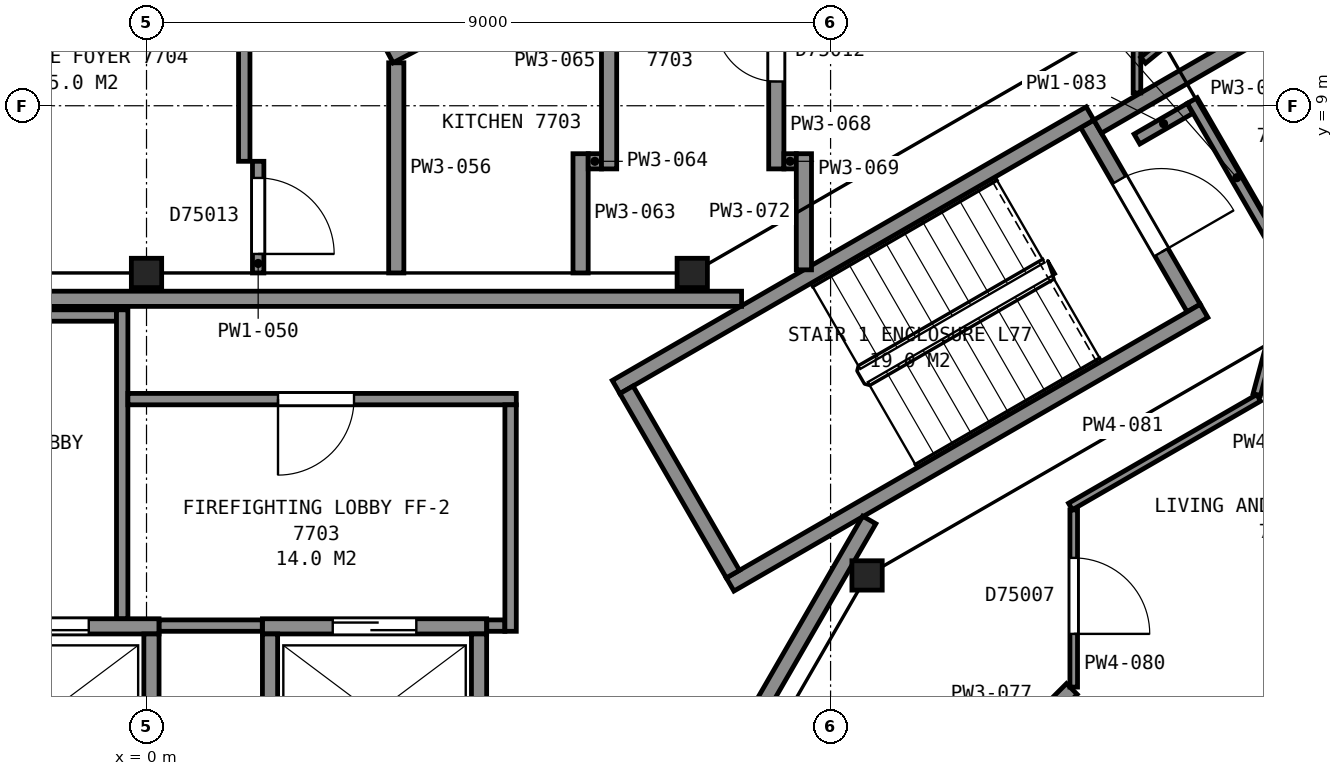
"""IFC4 building model, lengths in metres.
Left out: names, types, materials, properties, quantities, classifications, styles, units other than length and angle.
Written with IfcOpenShell. Run it as: python <this file> out.ifc"""

import sys

from ifc_helpers import new_model, si_unit, direction, frame, frame_2d, origin, origin_2d, place, context, subcontext, project, spatial, rectangle, i_section, extrude, element, fill, save


model = new_model("IFC4")
c1 = context("Model", 3, precision=1e-05, world=origin(), true_north=direction((0.0, 1.0)))
c2 = subcontext(c1, "Body", "Model", "MODEL_VIEW")
j1 = project(units=[si_unit("LENGTHUNIT", "METRE"), si_unit("PLANEANGLEUNIT", "RADIAN")], contexts=[c1])
p1 = place(None, origin())
s1 = spatial("IfcSite", under=j1, at=p1, CompositionType="ELEMENT")
p2 = place(p1, origin())
s2 = spatial("IfcBuilding", under=s1, at=p2, CompositionType="ELEMENT")
p3 = place(p2, frame((0.0, 0.0, 304.7)))
s3 = spatial("IfcBuildingStorey", under=s2, at=p3, CompositionType="ELEMENT", Elevation=304.7)
for number, where, z_axis, x_axis in (
    (1, (9.48, 2.82, 0.0), (0.0, 0.0, 1.0), (1.0, 0.0, 0.0)),
    (2, (7.18, 6.8, 0.0), (0.0, 0.0, 1.0), (1.0, 0.0, 0.0)),
    (3, (0.0, 6.8, 0.0), (0.0, 0.0, 1.0), (1.0, 0.0, 0.0)),
):
    element("IfcColumn", number, at=place(p3, frame(where, z_axis=z_axis, x_axis=x_axis)), inside=s3, PredefinedType="COLUMN", context=c2, shape_type="SweptSolid", body=[
        extrude(i_section(OverallWidth=0.399, OverallDepth=0.386, WebThickness=0.021, FlangeThickness=0.033, FilletRadius=0.015, at=origin_2d()), origin(), (0.0, 0.0, 1.0), 3.7),
    ])
p4 = place(p3, frame((13.777, 6.338, 0.0), z_axis=(0.0, 0.0, 1.0), x_axis=(-0.500049511043, 0.865996816683, 0.0)))
e4 = element("IfcWall", 4, at=p4, inside=s3, PredefinedType="PARTITIONING", context=c2, shape_type="SweptSolid", body=[
    extrude(rectangle(XDim=2.8, YDim=0.2, at=frame_2d((1.4, 0.0))), origin(), (0.0, 0.0, 1.0), 3.45),
])
p5 = place(p4, frame((0.85, 0.0, 0.0)))
e5 = element("IfcOpeningElement", 5, at=p5, cuts=e4, PredefinedType="OPENING", context=c2, shape_type="SweptSolid", body=[
    extrude(rectangle(XDim=1.1, YDim=2.1, at=frame_2d((0.55, 1.05))), frame((0.0, 0.11, 0.0), z_axis=(0.0, -1.0, 0.0), x_axis=(1.0, 0.0, 0.0)), (0.0, 0.0, 1.0), 0.22),
])
for number, where, z_axis, x_axis in (
    (6, (6.178, 5.299, 0.0), (0.0, 0.0, 1.0), (0.866, 0.5, 0.0)),
    (7, (7.678, 2.701, 0.0), (0.0, 0.0, 1.0), (0.866, 0.5, 0.0)),
):
    element("IfcWall", number, at=place(p3, frame(where, z_axis=z_axis, x_axis=x_axis)), inside=s3, PredefinedType="PARTITIONING", context=c2, shape_type="SweptSolid", body=[
        extrude(rectangle(XDim=7.2, YDim=0.2, at=frame_2d((3.6, 0.0))), origin(), (0.0, 0.0, 1.0), 3.45),
    ])
p6 = place(p3, frame((7.715, 2.838, 0.0), z_axis=(0.0, 0.0, 1.0), x_axis=(-0.500049511043, 0.865996816683, 0.0)))
e8 = element("IfcWall", 8, at=p6, inside=s3, PredefinedType="PARTITIONING", context=c2, shape_type="SweptSolid", body=[
    extrude(rectangle(XDim=2.8, YDim=0.2, at=frame_2d((1.4, 0.0))), origin(), (0.0, 0.0, 1.0), 3.45),
])
p7 = place(p3, frame((-2.785, 2.15, 0.0), z_axis=(0.0, 0.0, 1.0), x_axis=(1.0, 0.0, 0.0)))
e9 = element("IfcWall", 9, at=p7, inside=s3, PredefinedType="PARTITIONING", context=c2, shape_type="SweptSolid", body=[
    extrude(rectangle(XDim=2.95, YDim=0.2, at=frame_2d((1.475, 0.0))), origin(), (0.0, 0.0, 1.0), 3.7),
])
p8 = place(p7, frame((0.925, 0.0, 0.0)))
e10 = element("IfcOpeningElement", 10, at=p8, cuts=e9, PredefinedType="OPENING", context=c2, shape_type="SweptSolid", body=[
    extrude(rectangle(XDim=1.1, YDim=2.1, at=frame_2d((0.55, 1.05))), frame((0.0, 0.11, 0.0), z_axis=(0.0, -1.0, 0.0), x_axis=(1.0, 0.0, 0.0)), (0.0, 0.0, 1.0), 0.22),
])
p9 = place(p3, frame((1.525, 2.15, 0.0), z_axis=(0.0, 0.0, 1.0), x_axis=(1.0, 0.0, 0.0)))
e11 = element("IfcWall", 11, at=p9, inside=s3, PredefinedType="PARTITIONING", context=c2, shape_type="SweptSolid", body=[
    extrude(rectangle(XDim=2.95, YDim=0.2, at=frame_2d((1.475, 0.0))), origin(), (0.0, 0.0, 1.0), 3.7),
])
p10 = place(p9, frame((0.925, 0.0, 0.0)))
e12 = element("IfcOpeningElement", 12, at=p10, cuts=e11, PredefinedType="OPENING", context=c2, shape_type="SweptSolid", body=[
    extrude(rectangle(XDim=1.1, YDim=2.1, at=frame_2d((0.55, 1.05))), frame((0.0, 0.11, 0.0), z_axis=(0.0, -1.0, 0.0), x_axis=(1.0, 0.0, 0.0)), (0.0, 0.0, 1.0), 0.22),
])
for number, where, z_axis, x_axis in (
    (13, (4.375, 0.1, 0.0), (0.0, 0.0, 1.0), (0.0, 1.0, 0.0)),
    (14, (1.625, 0.1, 0.0), (0.0, 0.0, 1.0), (0.0, 1.0, 0.0)),
    (15, (0.065, 0.1, 0.0), (0.0, 0.0, 1.0), (0.0, 1.0, 0.0)),
):
    element("IfcWall", number, at=place(p3, frame(where, z_axis=z_axis, x_axis=x_axis)), inside=s3, PredefinedType="PARTITIONING", context=c2, shape_type="SweptSolid", body=[
        extrude(rectangle(XDim=1.95, YDim=0.2, at=frame_2d((0.975, 0.0))), origin(), (0.0, 0.0, 1.0), 3.7),
    ])
p11 = place(p3, frame((7.829, 6.46, 0.0), z_axis=(0.0, 0.0, 1.0), x_axis=(-1.0, 0.0, 0.0)))
e16 = element("IfcWall", 16, at=p11, inside=s3, PredefinedType="PARTITIONING", context=c2, shape_type="SweptSolid", body=[
    extrude(rectangle(XDim=15.658, YDim=0.2, at=frame_2d((7.829, 0.0))), origin(), (0.0, 0.0, 1.0), 3.45),
])
p12 = place(p11, frame((12.168, 0.0, 0.0)))
e17 = element("IfcOpeningElement", 17, at=p12, cuts=e16, PredefinedType="OPENING", context=c2, shape_type="SweptSolid", body=[
    extrude(rectangle(XDim=1.2, YDim=2.1, at=frame_2d((0.6, 1.05))), frame((0.0, 0.11, 0.0), z_axis=(0.0, -1.0, 0.0), x_axis=(1.0, 0.0, 0.0)), (0.0, 0.0, 1.0), 0.22),
])
p13 = place(p3, frame((-4.025, 6.24, 0.0), z_axis=(0.0, 0.0, 1.0), x_axis=(1.0, 0.0, 0.0)))
e18 = element("IfcWall", 18, at=p13, inside=s3, PredefinedType="PARTITIONING", context=c2, shape_type="SweptSolid", body=[
    extrude(rectangle(XDim=3.63, YDim=0.15, at=frame_2d((1.815, 0.0))), origin(), (0.0, 0.0, 1.0), 3.45),
])
p14 = place(p3, frame((-0.32, 2.252, 0.0), z_axis=(0.0, 0.0, 1.0), x_axis=(0.0, 1.0, 0.0)))
e19 = element("IfcWall", 19, at=p14, inside=s3, PredefinedType="PARTITIONING", context=c2, shape_type="SweptSolid", body=[
    extrude(rectangle(XDim=4.063, YDim=0.15, at=frame_2d((2.031, 0.0))), origin(), (0.0, 0.0, 1.0), 3.45),
])
p15 = place(p3, frame((-0.245, 5.14, 0.0), z_axis=(0.0, 0.0, 1.0), x_axis=(1.0, 0.0, 0.0)))
e20 = element("IfcWall", 20, at=p15, inside=s3, PredefinedType="PARTITIONING", context=c2, shape_type="SweptSolid", body=[
    extrude(rectangle(XDim=5.11, YDim=0.15, at=frame_2d((2.555, 0.0))), origin(), (0.0, 0.0, 1.0), 3.45),
])
p16 = place(p15, frame((1.975, 0.0, 0.0)))
e21 = element("IfcOpeningElement", 21, at=p16, cuts=e20, PredefinedType="OPENING", context=c2, shape_type="SweptSolid", body=[
    extrude(rectangle(XDim=1.0, YDim=2.1, at=frame_2d((0.5, 1.05))), frame((0.0, 0.085, 0.0), z_axis=(0.0, -1.0, 0.0), x_axis=(1.0, 0.0, 0.0)), (0.0, 0.0, 1.0), 0.17),
])
p17 = place(p3, frame((0.167, 2.16, 0.0), z_axis=(0.0, 0.0, 1.0), x_axis=(1.0, 0.0, 0.0)))
e22 = element("IfcWall", 22, at=p17, inside=s3, PredefinedType="PARTITIONING", context=c2, shape_type="SweptSolid", body=[
    extrude(rectangle(XDim=1.356, YDim=0.15, at=frame_2d((0.678, 0.0))), origin(), (0.0, 0.0, 1.0), 3.45),
])
p18 = place(p3, frame((3.828, -6.29, 0.0), z_axis=(0.0, 0.0, 1.0), x_axis=(0.499979739078, 0.866037101117, 0.0)))
e23 = element("IfcWall", 23, at=p18, inside=s3, PredefinedType="PARTITIONING", context=c2, shape_type="SweptSolid", body=[
    extrude(rectangle(XDim=11.363, YDim=0.2, at=frame_2d((5.681, 0.0))), origin(), (0.0, 0.0, 1.0), 3.45),
])
p19 = place(p18, frame((0.55, 0.0, 0.0)))
e24 = element("IfcOpeningElement", 24, at=p19, cuts=e23, PredefinedType="OPENING", context=c2, shape_type="SweptSolid", body=[
    extrude(rectangle(XDim=1.2, YDim=2.1, at=frame_2d((0.6, 1.05))), frame((0.0, 0.11, 0.0), z_axis=(0.0, -1.0, 0.0), x_axis=(1.0, 0.0, 0.0)), (0.0, 0.0, 1.0), 0.22),
])
p20 = place(p3, frame((4.477, 2.16, 0.0), z_axis=(0.0, 0.0, 1.0), x_axis=(1.0, 0.0, 0.0)))
e25 = element("IfcWall", 25, at=p20, inside=s3, PredefinedType="PARTITIONING", context=c2, shape_type="SweptSolid", body=[
    extrude(rectangle(XDim=0.238, YDim=0.15, at=frame_2d((0.119, 0.0))), origin(), (0.0, 0.0, 1.0), 3.45),
])
p21 = place(p3, frame((4.79, 2.085, 0.0), z_axis=(0.0, 0.0, 1.0), x_axis=(0.0, 1.0, 0.0)))
e26 = element("IfcWall", 26, at=p21, inside=s3, PredefinedType="PARTITIONING", context=c2, shape_type="SweptSolid", body=[
    extrude(rectangle(XDim=2.98, YDim=0.15, at=frame_2d((1.49, 0.0))), origin(), (0.0, 0.0, 1.0), 3.45),
])
p22 = place(p3, frame((1.286, 8.269, 0.0), z_axis=(0.0, 0.0, 1.0), x_axis=(0.0, 1.0, 0.0)))
e27 = element("IfcWall", 27, at=p22, inside=s3, PredefinedType="PARTITIONING", context=c2, shape_type="SweptSolid", body=[
    extrude(rectangle(XDim=5.082, YDim=0.15, at=frame_2d((2.541, 0.0))), origin(), (0.0, 0.0, 1.0), 2.723),
])
p23 = place(p3, frame((1.469, 8.269, 0.0), z_axis=(0.0, 0.0, 1.0), x_axis=(0.0, -1.0, 0.0)))
e28 = element("IfcWall", 28, at=p23, inside=s3, PredefinedType="PARTITIONING", context=c2, shape_type="SweptSolid", body=[
    extrude(rectangle(XDim=1.469, YDim=0.15, at=frame_2d((0.734, 0.0))), origin(), (0.0, 0.0, 1.0), 2.723),
])
p24 = place(p23, frame((0.219, 0.0, 0.0)))
e29 = element("IfcOpeningElement", 29, at=p24, cuts=e28, PredefinedType="OPENING", context=c2, shape_type="SweptSolid", body=[
    extrude(rectangle(XDim=1.0, YDim=2.1, at=frame_2d((0.5, 1.05))), frame((0.0, 0.085, 0.0), z_axis=(0.0, -1.0, 0.0), x_axis=(1.0, 0.0, 0.0)), (0.0, 0.0, 1.0), 0.17),
])
p25 = place(p3, frame((3.286, 6.8, 0.0), z_axis=(0.0, 0.0, 1.0), x_axis=(0.0, 1.0, 0.0)))
e30 = element("IfcWall", 30, at=p25, inside=s3, PredefinedType="PARTITIONING", context=c2, shape_type="SweptSolid", body=[
    extrude(rectangle(XDim=2.765, YDim=0.2, at=frame_2d((1.382, 0.0))), origin(), (0.0, 0.0, 1.0), 2.723),
])
p26 = place(p3, frame((6.175, 11.216, 0.0), z_axis=(0.0, 0.0, 1.0), x_axis=(-0.885512941371, -0.464614712062, 0.0)))
e31 = element("IfcWall", 31, at=p26, inside=s3, PredefinedType="PARTITIONING", context=c2, shape_type="SweptSolid", body=[
    extrude(rectangle(XDim=3.362, YDim=0.2, at=frame_2d((1.681, 0.0))), origin(), (0.0, 0.0, 1.0), 2.723),
])
p27 = place(p26, frame((1.212, 0.0, 0.0)))
e32 = element("IfcOpeningElement", 32, at=p27, cuts=e31, PredefinedType="OPENING", context=c2, shape_type="SweptSolid", body=[
    extrude(rectangle(XDim=0.9, YDim=2.1, at=frame_2d((0.45, 1.05))), frame((0.0, 0.11, 0.0), z_axis=(0.0, -1.0, 0.0), x_axis=(1.0, 0.0, 0.0)), (0.0, 0.0, 1.0), 0.22),
])
p28 = place(p3, frame((5.711, 6.8, 0.0), z_axis=(0.0, 0.0, 1.0), x_axis=(0.0, 1.0, 0.0)))
e33 = element("IfcWall", 33, at=p28, inside=s3, PredefinedType="PARTITIONING", context=c2, shape_type="SweptSolid", body=[
    extrude(rectangle(XDim=1.569, YDim=0.2, at=frame_2d((0.784, 0.0))), origin(), (0.0, 0.0, 1.0), 2.723),
])
p29 = place(p3, frame((5.811, 8.269, 0.0), z_axis=(0.0, 0.0, 1.0), x_axis=(1.0, 0.0, 0.0)))
e34 = element("IfcWall", 34, at=p29, inside=s3, PredefinedType="PARTITIONING", context=c2, shape_type="SweptSolid", body=[
    extrude(rectangle(XDim=0.175, YDim=0.2, at=frame_2d((0.087, 0.0))), origin(), (0.0, 0.0, 1.0), 2.723),
])
p30 = place(p3, frame((6.086, 8.169, 0.0), z_axis=(0.0, 0.0, 1.0), x_axis=(0.0, 1.0, 0.0)))
e35 = element("IfcWall", 35, at=p30, inside=s3, PredefinedType="PARTITIONING", context=c2, shape_type="SweptSolid", body=[
    extrude(rectangle(XDim=2.835, YDim=0.2, at=frame_2d((1.417, 0.0))), origin(), (0.0, 0.0, 1.0), 2.723),
])
p31 = place(p3, frame((8.286, 8.169, 0.0), z_axis=(0.0, 0.0, 1.0), x_axis=(0.0, 1.0, 0.0)))
e36 = element("IfcWall", 36, at=p31, inside=s3, PredefinedType="PARTITIONING", context=c2, shape_type="SweptSolid", body=[
    extrude(rectangle(XDim=3.1, YDim=0.2, at=frame_2d((1.55, 0.0))), origin(), (0.0, 0.0, 1.0), 2.723),
])
p32 = place(p31, frame((1.15, 0.0, 0.0)))
e37 = element("IfcOpeningElement", 37, at=p32, cuts=e36, PredefinedType="OPENING", context=c2, shape_type="SweptSolid", body=[
    extrude(rectangle(XDim=0.8, YDim=2.1, at=frame_2d((0.4, 1.05))), frame((0.0, 0.11, 0.0), z_axis=(0.0, -1.0, 0.0), x_axis=(1.0, 0.0, 0.0)), (0.0, 0.0, 1.0), 0.22),
])
p33 = place(p3, frame((8.386, 8.269, 0.0), z_axis=(0.0, 0.0, 1.0), x_axis=(1.0, 0.0, 0.0)))
e38 = element("IfcWall", 38, at=p33, inside=s3, PredefinedType="PARTITIONING", context=c2, shape_type="SweptSolid", body=[
    extrude(rectangle(XDim=0.163, YDim=0.2, at=frame_2d((0.082, 0.0))), origin(), (0.0, 0.0, 1.0), 2.723),
])
p34 = place(p3, frame((8.649, 6.841, 0.0), z_axis=(0.0, 0.0, 1.0), x_axis=(0.0, 1.0, 0.0)))
e39 = element("IfcWall", 39, at=p34, inside=s3, PredefinedType="PARTITIONING", context=c2, shape_type="SweptSolid", body=[
    extrude(rectangle(XDim=1.528, YDim=0.2, at=frame_2d((0.764, 0.0))), origin(), (0.0, 0.0, 1.0), 2.723),
])
p35 = place(p3, frame((10.878, 0.03, 0.0), z_axis=(0.0, 0.0, 1.0), x_axis=(0.707173379423, 0.707040176677, 0.0)))
e40 = element("IfcWall", 40, at=p35, inside=s3, PredefinedType="PARTITIONING", context=c2, shape_type="SweptSolid", body=[
    extrude(rectangle(XDim=1.833, YDim=0.2, at=frame_2d((0.917, 0.0))), origin(), (0.0, 0.0, 1.0), 2.723),
])
p36 = place(p3, frame((12.199, 3.682, 0.0), z_axis=(0.0, 0.0, 1.0), x_axis=(0.0, -1.0, 0.0)))
e41 = element("IfcWall", 41, at=p36, inside=s3, PredefinedType="PARTITIONING", context=c2, shape_type="SweptSolid", body=[
    extrude(rectangle(XDim=2.331, YDim=0.1, at=frame_2d((1.166, 0.0))), origin(), (0.0, 0.0, 1.0), 2.723),
])
p37 = place(p36, frame((0.631, 0.0, 0.0)))
e42 = element("IfcOpeningElement", 42, at=p37, cuts=e41, PredefinedType="OPENING", context=c2, shape_type="SweptSolid", body=[
    extrude(rectangle(XDim=1.0, YDim=2.1, at=frame_2d((0.5, 1.05))), frame((0.0, 0.06, 0.0), z_axis=(0.0, -1.0, 0.0), x_axis=(1.0, 0.0, 0.0)), (0.0, 0.0, 1.0), 0.12),
])
p38 = place(p3, frame((12.156, 3.727, 0.0), z_axis=(0.0, 0.0, 1.0), x_axis=(0.866012137121, 0.500022977831, 0.0)))
e43 = element("IfcWall", 43, at=p38, inside=s3, PredefinedType="PARTITIONING", context=c2, shape_type="SweptSolid", body=[
    extrude(rectangle(XDim=2.86, YDim=0.1, at=frame_2d((1.43, 0.0))), origin(), (0.0, 0.0, 1.0), 2.723),
])
p39 = place(p3, frame((12.514, 8.726, 0.0), z_axis=(0.0, 0.0, 1.0), x_axis=(0.865969617579, 0.500096612097, 0.0)))
e44 = element("IfcWall", 44, at=p39, inside=s3, PredefinedType="PARTITIONING", context=c2, shape_type="SweptSolid", body=[
    extrude(rectangle(XDim=2.899, YDim=0.2, at=frame_2d((1.45, 0.0))), origin(), (0.0, 0.0, 1.0), 2.723),
])
p40 = place(p3, frame((13.031, 8.562, 0.0), z_axis=(0.0, 0.0, 1.0), x_axis=(0.865798205633, 0.500393312429, 0.0)))
e45 = element("IfcWall", 45, at=p40, inside=s3, PredefinedType="PARTITIONING", context=c2, shape_type="SweptSolid", body=[
    extrude(rectangle(XDim=0.808, YDim=0.15, at=frame_2d((0.404, 0.0))), origin(), (0.0, 0.0, 1.0), 2.723),
])
p41 = place(p3, frame((13.031, 13.351, 0.0), z_axis=(0.0, 0.0, 1.0), x_axis=(0.0, -1.0, 0.0)))
e46 = element("IfcWall", 46, at=p41, inside=s3, PredefinedType="PARTITIONING", context=c2, shape_type="SweptSolid", body=[
    extrude(rectangle(XDim=4.183, YDim=0.1, at=frame_2d((2.091, 0.0))), origin(), (0.0, 0.0, 1.0), 2.723),
])
p42 = place(p41, frame((1.469, 0.0, 0.0)))
e47 = element("IfcOpeningElement", 47, at=p42, cuts=e46, PredefinedType="OPENING", context=c2, shape_type="SweptSolid", body=[
    extrude(rectangle(XDim=0.9, YDim=2.1, at=frame_2d((0.45, 1.05))), frame((0.0, 0.06, 0.0), z_axis=(0.0, -1.0, 0.0), x_axis=(1.0, 0.0, 0.0)), (0.0, 0.0, 1.0), 0.12),
])
p43 = place(p3, frame((17.733, 13.38, 0.0), z_axis=(0.0, 0.0, 1.0), x_axis=(-0.773858908961, -0.633358025939, 0.0)))
e48 = element("IfcWall", 48, at=p43, inside=s3, PredefinedType="PARTITIONING", context=c2, shape_type="SweptSolid", body=[
    extrude(rectangle(XDim=5.97, YDim=0.1, at=frame_2d((2.985, 0.0))), origin(), (0.0, 0.0, 1.0), 2.723),
])
p44 = place(p43, frame((2.626, 0.0, 0.0)))
e49 = element("IfcOpeningElement", 49, at=p44, cuts=e48, PredefinedType="OPENING", context=c2, shape_type="SweptSolid", body=[
    extrude(rectangle(XDim=1.0, YDim=2.1, at=frame_2d((0.5, 1.05))), frame((0.0, 0.06, 0.0), z_axis=(0.0, -1.0, 0.0), x_axis=(1.0, 0.0, 0.0)), (0.0, 0.0, 1.0), 0.12),
])
p45 = place(p3, frame((13.759, 9.069, 0.0), z_axis=(0.0, 0.0, 1.0), x_axis=(0.500046885369, -0.865998332812, 0.0)))
e50 = element("IfcWall", 50, at=p45, inside=s3, PredefinedType="PARTITIONING", context=c2, shape_type="SweptSolid", body=[
    extrude(rectangle(XDim=2.345, YDim=0.15, at=frame_2d((1.172, 0.0))), origin(), (0.0, 0.0, 1.0), 2.723),
])
p46 = place(p3, frame((14.607, 5.2, 0.0), z_axis=(0.0, 0.0, 1.0), x_axis=(0.258519214507, 0.966006115783, 0.0)))
e51 = element("IfcWall", 51, at=p46, inside=s3, PredefinedType="PARTITIONING", context=c2, shape_type="SweptSolid", body=[
    extrude(rectangle(XDim=1.632, YDim=0.1, at=frame_2d((0.816, 0.0))), origin(), (0.0, 0.0, 1.0), 2.723),
])
p47 = place(p5, origin())
e52 = element("IfcDoor", 52, at=p47, inside=s3, OperationType="SINGLE_SWING_LEFT", PredefinedType="DOOR", context=c2, shape_type="SweptSolid", body=[
    extrude(rectangle(XDim=1.1, YDim=2.1, at=frame_2d((0.55, 1.05))), frame((0.0, 0.025, 0.0), z_axis=(0.0, -1.0, 0.0), x_axis=(1.0, 0.0, 0.0)), (0.0, 0.0, 1.0), 0.05),
])
fill(e5, e52)
p48 = place(p8, origin())
e53 = element("IfcDoor", 53, at=p48, inside=s3, OperationType="SLIDING_TO_LEFT", PredefinedType="DOOR", context=c2, shape_type="SweptSolid", body=[
    extrude(rectangle(XDim=1.1, YDim=2.1, at=frame_2d((0.55, 1.05))), frame((0.0, 0.025, 0.0), z_axis=(0.0, -1.0, 0.0), x_axis=(1.0, 0.0, 0.0)), (0.0, 0.0, 1.0), 0.05),
])
fill(e10, e53)
p49 = place(p10, origin())
e54 = element("IfcDoor", 54, at=p49, inside=s3, OperationType="SLIDING_TO_RIGHT", PredefinedType="DOOR", context=c2, shape_type="SweptSolid", body=[
    extrude(rectangle(XDim=1.1, YDim=2.1, at=frame_2d((0.55, 1.05))), frame((0.0, 0.025, 0.0), z_axis=(0.0, -1.0, 0.0), x_axis=(1.0, 0.0, 0.0)), (0.0, 0.0, 1.0), 0.05),
])
fill(e12, e54)
p50 = place(p16, origin())
e55 = element("IfcDoor", 55, at=p50, inside=s3, OperationType="SINGLE_SWING_LEFT", PredefinedType="DOOR", context=c2, shape_type="SweptSolid", body=[
    extrude(rectangle(XDim=1.0, YDim=2.1, at=frame_2d((0.5, 1.05))), frame((0.0, 0.025, 0.0), z_axis=(0.0, -1.0, 0.0), x_axis=(1.0, 0.0, 0.0)), (0.0, 0.0, 1.0), 0.05),
])
fill(e21, e55)
p51 = place(p24, origin())
e56 = element("IfcDoor", 56, at=p51, inside=s3, OperationType="SINGLE_SWING_RIGHT", PredefinedType="DOOR", context=c2, shape_type="SweptSolid", body=[
    extrude(rectangle(XDim=1.0, YDim=2.1, at=frame_2d((0.5, 1.05))), frame((0.0, 0.025, 0.0), z_axis=(0.0, -1.0, 0.0), x_axis=(1.0, 0.0, 0.0)), (0.0, 0.0, 1.0), 0.05),
])
fill(e29, e56)
p52 = place(p32, origin())
e57 = element("IfcDoor", 57, at=p52, inside=s3, OperationType="SINGLE_SWING_RIGHT", PredefinedType="DOOR", context=c2, shape_type="SweptSolid", body=[
    extrude(rectangle(XDim=0.8, YDim=2.1, at=frame_2d((0.4, 1.05))), frame((0.0, 0.025, 0.0), z_axis=(0.0, -1.0, 0.0), x_axis=(1.0, 0.0, 0.0)), (0.0, 0.0, 1.0), 0.05),
])
fill(e37, e57)
p53 = place(p37, origin())
e58 = element("IfcDoor", 58, at=p53, inside=s3, OperationType="SINGLE_SWING_RIGHT", PredefinedType="DOOR", context=c2, shape_type="SweptSolid", body=[
    extrude(rectangle(XDim=1.0, YDim=2.1, at=frame_2d((0.5, 1.05))), frame((0.0, 0.025, 0.0), z_axis=(0.0, -1.0, 0.0), x_axis=(1.0, 0.0, 0.0)), (0.0, 0.0, 1.0), 0.05),
])
fill(e42, e58)
save(model, sys.argv[1])
